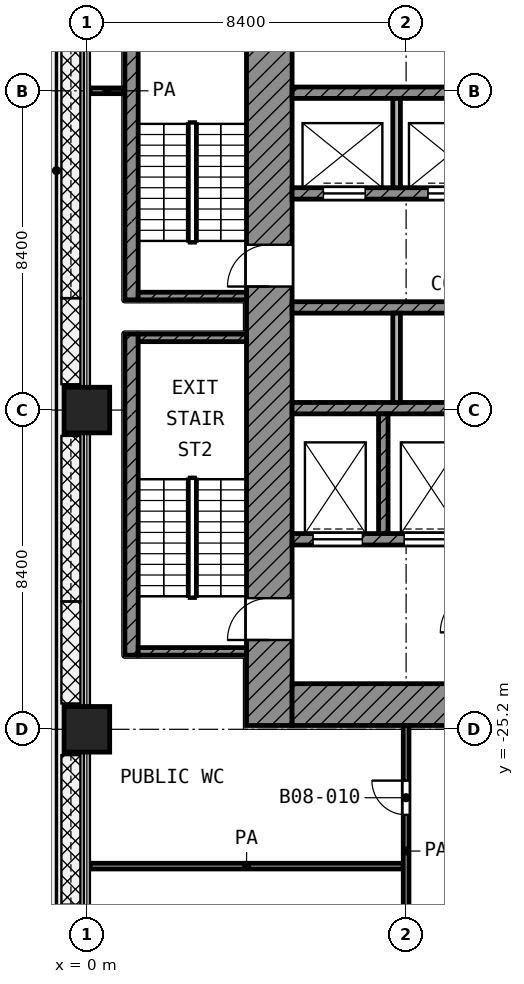
"""IFC4 building model, lengths in metres.
Left out: names, types, materials, properties, quantities, classifications, styles, units other than length and angle.
Written with IfcOpenShell. Run it as: python <this file> out.ifc"""

import sys

from ifc_helpers import new_model, si_unit, direction, frame, frame_2d, origin, origin_2d, place, context, subcontext, project, spatial, rectangle, extrude, element, fill, save


model = new_model("IFC4")
c1 = context("Model", 3, precision=1e-05, world=origin(), true_north=direction((0.0, 1.0)))
c2 = subcontext(c1, "Body", "Model", "MODEL_VIEW")
j1 = project(units=[si_unit("LENGTHUNIT", "METRE"), si_unit("PLANEANGLEUNIT", "RADIAN")], contexts=[c1])
p1 = place(None, origin())
s1 = spatial("IfcSite", under=j1, at=p1, CompositionType="ELEMENT")
p2 = place(p1, origin())
s2 = spatial("IfcBuilding", under=s1, at=p2, CompositionType="ELEMENT")
p3 = place(p2, frame((0.0, 0.0, 39.2)))
s3 = spatial("IfcBuildingStorey", under=s2, at=p3, CompositionType="ELEMENT", Elevation=39.2)
for number, where, z_axis, x_axis in (
    (1, (0.0, -16.8, 0.0), (0.0, 0.0, 1.0), (1.0, 0.0, 0.0)),
    (2, (0.0, -25.2, 0.0), (0.0, 0.0, 1.0), (1.0, 0.0, 0.0)),
):
    element("IfcColumn", number, at=place(p3, frame(where, z_axis=z_axis, x_axis=x_axis)), inside=s3, PredefinedType="COLUMN", context=c2, shape_type="SweptSolid", body=[
        extrude(rectangle(XDim=1.2, YDim=1.2, at=origin_2d()), origin(), (0.0, 0.0, 1.0), 4.2),
    ])
p4 = place(p3, frame((4.8, -25.1, 0.0), z_axis=(0.0, 0.0, 1.0), x_axis=(0.0, 1.0, 0.0)))
e3 = element("IfcWall", 3, at=p4, inside=s3, PredefinedType="SHEAR", context=c2, shape_type="SweptSolid", body=[
    extrude(rectangle(XDim=19.7, YDim=1.2, at=frame_2d((9.85, 0.0))), origin(), (0.0, 0.0, 1.0), 3.9),
])
p5 = place(p4, frame((11.55, 0.0, 0.0)))
e4 = element("IfcOpeningElement", 4, at=p5, cuts=e3, PredefinedType="OPENING", context=c2, shape_type="SweptSolid", body=[
    extrude(rectangle(XDim=1.1, YDim=2.1, at=frame_2d((0.55, 1.05))), frame((0.0, 0.61, 0.0), z_axis=(0.0, -1.0, 0.0), x_axis=(1.0, 0.0, 0.0)), (0.0, 0.0, 1.0), 1.22),
])
p6 = place(p4, frame((2.25, 0.0, 0.0)))
e5 = element("IfcOpeningElement", 5, at=p6, cuts=e3, PredefinedType="OPENING", context=c2, shape_type="SweptSolid", body=[
    extrude(rectangle(XDim=1.1, YDim=2.1, at=frame_2d((0.55, 1.05))), frame((0.0, 0.61, 0.0), z_axis=(0.0, -1.0, 0.0), x_axis=(1.0, 0.0, 0.0)), (0.0, 0.0, 1.0), 1.22),
])
p7 = place(p3, frame((5.4, -24.55, 0.0), z_axis=(0.0, 0.0, 1.0), x_axis=(1.0, 0.0, 0.0)))
e6 = element("IfcWall", 6, at=p7, inside=s3, PredefinedType="SHEAR", context=c2, shape_type="SweptSolid", body=[
    extrude(rectangle(XDim=18.6, YDim=1.1, at=frame_2d((9.3, 0.0))), origin(), (0.0, 0.0, 1.0), 3.9),
])
p8 = place(p7, frame((6.3, 0.0, 0.0)))
e7 = element("IfcOpeningElement", 7, at=p8, cuts=e6, PredefinedType="OPENING", context=c2, shape_type="SweptSolid", body=[
    extrude(rectangle(XDim=1.8, YDim=2.1, at=frame_2d((0.9, 1.05))), frame((0.0, 0.56, 0.0), z_axis=(0.0, -1.0, 0.0), x_axis=(1.0, 0.0, 0.0)), (0.0, 0.0, 1.0), 1.12),
])
p9 = place(p3, frame((5.4, -8.45, 0.0), z_axis=(0.0, 0.0, 1.0), x_axis=(1.0, 0.0, 0.0)))
e8 = element("IfcWall", 8, at=p9, inside=s3, PredefinedType="SHEAR", context=c2, shape_type="SweptSolid", body=[
    extrude(rectangle(XDim=16.65, YDim=0.3, at=frame_2d((8.325, 0.0))), origin(), (0.0, 0.0, 1.0), 3.9),
])
p10 = place(p3, frame((5.4, -11.1, 0.0), z_axis=(0.0, 0.0, 1.0), x_axis=(1.0, 0.0, 0.0)))
e9 = element("IfcWall", 9, at=p10, inside=s3, PredefinedType="SHEAR", context=c2, shape_type="SweptSolid", body=[
    extrude(rectangle(XDim=16.65, YDim=0.3, at=frame_2d((8.325, 0.0))), origin(), (0.0, 0.0, 1.0), 3.9),
])
p11 = place(p10, frame((0.825, 0.0, 0.0)))
e10 = element("IfcOpeningElement", 10, at=p11, cuts=e9, PredefinedType="OPENING", context=c2, shape_type="SweptSolid", body=[
    extrude(rectangle(XDim=1.1, YDim=2.1, at=frame_2d((0.55, 1.05))), frame((0.0, 0.16, 0.0), z_axis=(0.0, -1.0, 0.0), x_axis=(1.0, 0.0, 0.0)), (0.0, 0.0, 1.0), 0.32),
])
p12 = place(p10, frame((3.575, 0.0, 0.0)))
e11 = element("IfcOpeningElement", 11, at=p12, cuts=e9, PredefinedType="OPENING", context=c2, shape_type="SweptSolid", body=[
    extrude(rectangle(XDim=1.1, YDim=2.1, at=frame_2d((0.55, 1.05))), frame((0.0, 0.16, 0.0), z_axis=(0.0, -1.0, 0.0), x_axis=(1.0, 0.0, 0.0)), (0.0, 0.0, 1.0), 0.32),
])
p13 = place(p10, frame((6.325, 0.0, 0.0)))
e12 = element("IfcOpeningElement", 12, at=p13, cuts=e9, PredefinedType="OPENING", context=c2, shape_type="SweptSolid", body=[
    extrude(rectangle(XDim=1.1, YDim=2.1, at=frame_2d((0.55, 1.05))), frame((0.0, 0.16, 0.0), z_axis=(0.0, -1.0, 0.0), x_axis=(1.0, 0.0, 0.0)), (0.0, 0.0, 1.0), 0.32),
])
p14 = place(p10, frame((9.075, 0.0, 0.0)))
e13 = element("IfcOpeningElement", 13, at=p14, cuts=e9, PredefinedType="OPENING", context=c2, shape_type="SweptSolid", body=[
    extrude(rectangle(XDim=1.1, YDim=2.1, at=frame_2d((0.55, 1.05))), frame((0.0, 0.16, 0.0), z_axis=(0.0, -1.0, 0.0), x_axis=(1.0, 0.0, 0.0)), (0.0, 0.0, 1.0), 0.32),
])
for number, where, z_axis, x_axis in (
    (14, (5.4, -14.1, 0.0), (0.0, 0.0, 1.0), (1.0, 0.0, 0.0)),
    (15, (5.4, -16.75, 0.0), (0.0, 0.0, 1.0), (1.0, 0.0, 0.0)),
):
    element("IfcWall", number, at=place(p3, frame(where, z_axis=z_axis, x_axis=x_axis)), inside=s3, PredefinedType="SHEAR", context=c2, shape_type="SweptSolid", body=[
        extrude(rectangle(XDim=16.65, YDim=0.3, at=frame_2d((8.325, 0.0))), origin(), (0.0, 0.0, 1.0), 3.9),
    ])
p15 = place(p3, frame((5.4, -20.2, 0.0), z_axis=(0.0, 0.0, 1.0), x_axis=(1.0, 0.0, 0.0)))
e16 = element("IfcWall", 16, at=p15, inside=s3, PredefinedType="SHEAR", context=c2, shape_type="SweptSolid", body=[
    extrude(rectangle(XDim=14.65, YDim=0.3, at=frame_2d((7.325, 0.0))), origin(), (0.0, 0.0, 1.0), 3.9),
])
p16 = place(p15, frame((10.55, 0.0, 0.0)))
e17 = element("IfcOpeningElement", 17, at=p16, cuts=e16, PredefinedType="OPENING", context=c2, shape_type="SweptSolid", body=[
    extrude(rectangle(XDim=1.3, YDim=2.1, at=frame_2d((0.65, 1.05))), frame((0.0, 0.16, 0.0), z_axis=(0.0, -1.0, 0.0), x_axis=(1.0, 0.0, 0.0)), (0.0, 0.0, 1.0), 0.32),
])
p17 = place(p15, frame((12.95, 0.0, 0.0)))
e18 = element("IfcOpeningElement", 18, at=p17, cuts=e16, PredefinedType="OPENING", context=c2, shape_type="SweptSolid", body=[
    extrude(rectangle(XDim=1.3, YDim=2.1, at=frame_2d((0.65, 1.05))), frame((0.0, 0.16, 0.0), z_axis=(0.0, -1.0, 0.0), x_axis=(1.0, 0.0, 0.0)), (0.0, 0.0, 1.0), 0.32),
])
p18 = place(p15, frame((0.55, 0.0, 0.0)))
e19 = element("IfcOpeningElement", 19, at=p18, cuts=e16, PredefinedType="OPENING", context=c2, shape_type="SweptSolid", body=[
    extrude(rectangle(XDim=1.3, YDim=2.1, at=frame_2d((0.65, 1.05))), frame((0.0, 0.16, 0.0), z_axis=(0.0, -1.0, 0.0), x_axis=(1.0, 0.0, 0.0)), (0.0, 0.0, 1.0), 0.32),
])
p19 = place(p15, frame((2.95, 0.0, 0.0)))
e20 = element("IfcOpeningElement", 20, at=p19, cuts=e16, PredefinedType="OPENING", context=c2, shape_type="SweptSolid", body=[
    extrude(rectangle(XDim=1.3, YDim=2.1, at=frame_2d((0.65, 1.05))), frame((0.0, 0.16, 0.0), z_axis=(0.0, -1.0, 0.0), x_axis=(1.0, 0.0, 0.0)), (0.0, 0.0, 1.0), 0.32),
])
p20 = place(p15, frame((7.15, 0.0, 0.0)))
e21 = element("IfcOpeningElement", 21, at=p20, cuts=e16, PredefinedType="OPENING", context=c2, shape_type="SweptSolid", body=[
    extrude(rectangle(XDim=0.9, YDim=2.1, at=frame_2d((0.45, 1.05))), frame((0.0, 0.16, 0.0), z_axis=(0.0, -1.0, 0.0), x_axis=(1.0, 0.0, 0.0)), (0.0, 0.0, 1.0), 0.32),
])
p21 = place(p3, frame((7.8, -20.05, 0.0), z_axis=(0.0, 0.0, 1.0), x_axis=(0.0, 1.0, 0.0)))
e22 = element("IfcWall", 22, at=p21, inside=s3, PredefinedType="SHEAR", context=c2, shape_type="SweptSolid", body=[
    extrude(rectangle(XDim=3.15, YDim=0.25, at=frame_2d((1.575, 0.0))), origin(), (0.0, 0.0, 1.0), 3.9),
])
p22 = place(p3, frame((8.15, -10.95, 0.0), z_axis=(0.0, 0.0, 1.0), x_axis=(0.0, 1.0, 0.0)))
e23 = element("IfcWall", 23, at=p22, inside=s3, PredefinedType="PARTITIONING", context=c2, shape_type="SweptSolid", body=[
    extrude(rectangle(XDim=2.35, YDim=0.2, at=frame_2d((1.175, 0.0))), origin(), (0.0, 0.0, 1.0), 3.9),
])
p23 = place(p3, frame((8.15, -16.6, 0.0), z_axis=(0.0, 0.0, 1.0), x_axis=(0.0, 1.0, 0.0)))
e24 = element("IfcWall", 24, at=p23, inside=s3, PredefinedType="PARTITIONING", context=c2, shape_type="SweptSolid", body=[
    extrude(rectangle(XDim=2.35, YDim=0.2, at=frame_2d((1.175, 0.0))), origin(), (0.0, 0.0, 1.0), 3.9),
])
p24 = place(p3, frame((1.175, -13.9, 0.0), z_axis=(0.0, 0.0, 1.0), x_axis=(0.0, 1.0, 0.0)))
e25 = element("IfcWall", 25, at=p24, inside=s3, PredefinedType="SHEAR", context=c2, shape_type="SweptSolid", body=[
    extrude(rectangle(XDim=8.45, YDim=0.35, at=frame_2d((4.225, 0.0))), origin(), (0.0, 0.0, 1.0), 3.9),
])
p25 = place(p3, frame((1.35, -13.8, 0.0), z_axis=(0.0, 0.0, 1.0), x_axis=(1.0, 0.0, 0.0)))
e26 = element("IfcWall", 26, at=p25, inside=s3, PredefinedType="SHEAR", context=c2, shape_type="SweptSolid", body=[
    extrude(rectangle(XDim=2.85, YDim=0.2, at=frame_2d((1.425, 0.0))), origin(), (0.0, 0.0, 1.0), 3.9),
])
p26 = place(p3, frame((1.175, -23.25, 0.0), z_axis=(0.0, 0.0, 1.0), x_axis=(0.0, 1.0, 0.0)))
e27 = element("IfcWall", 27, at=p26, inside=s3, PredefinedType="SHEAR", context=c2, shape_type="SweptSolid", body=[
    extrude(rectangle(XDim=8.45, YDim=0.35, at=frame_2d((4.225, 0.0))), origin(), (0.0, 0.0, 1.0), 3.9),
])
for number, where, z_axis, x_axis in (
    (28, (1.35, -14.9, 0.0), (0.0, 0.0, 1.0), (1.0, 0.0, 0.0)),
    (29, (1.35, -23.15, 0.0), (0.0, 0.0, 1.0), (1.0, 0.0, 0.0)),
):
    element("IfcWall", number, at=place(p3, frame(where, z_axis=z_axis, x_axis=x_axis)), inside=s3, PredefinedType="SHEAR", context=c2, shape_type="SweptSolid", body=[
        extrude(rectangle(XDim=2.85, YDim=0.2, at=frame_2d((1.425, 0.0))), origin(), (0.0, 0.0, 1.0), 3.9),
    ])
p27 = place(p3, frame((0.08, -28.8, 0.0), z_axis=(0.0, 0.0, 1.0), x_axis=(1.0, 0.0, 0.0)))
e30 = element("IfcWall", 30, at=p27, inside=s3, PredefinedType="PARTITIONING", context=c2, shape_type="SweptSolid", body=[
    extrude(rectangle(XDim=8.245, YDim=0.15, at=frame_2d((4.123, 0.0))), origin(), (0.0, 0.0, 1.0), 3.9),
])
p28 = place(p3, frame((0.08, -8.4, 0.0), z_axis=(0.0, 0.0, 1.0), x_axis=(1.0, 0.0, 0.0)))
e31 = element("IfcWall", 31, at=p28, inside=s3, PredefinedType="PARTITIONING", context=c2, shape_type="SweptSolid", body=[
    extrude(rectangle(XDim=0.89, YDim=0.15, at=frame_2d((0.445, 0.0))), origin(), (0.0, 0.0, 1.0), 3.9),
])
p29 = place(p3, frame((8.4, -31.707, 0.0), z_axis=(0.0, 0.0, 1.0), x_axis=(0.0, 1.0, 0.0)))
e32 = element("IfcWall", 32, at=p29, inside=s3, PredefinedType="PARTITIONING", context=c2, shape_type="SweptSolid", body=[
    extrude(rectangle(XDim=6.607, YDim=0.15, at=frame_2d((3.303, 0.0))), origin(), (0.0, 0.0, 1.0), 3.9),
])
p30 = place(p29, frame((4.257, 0.0, 0.0)))
e33 = element("IfcOpeningElement", 33, at=p30, cuts=e32, PredefinedType="OPENING", context=c2, shape_type="SweptSolid", body=[
    extrude(rectangle(XDim=0.9, YDim=2.1, at=frame_2d((0.45, 1.05))), frame((0.0, 0.085, 0.0), z_axis=(0.0, -1.0, 0.0), x_axis=(1.0, 0.0, 0.0)), (0.0, 0.0, 1.0), 0.17),
])
p31 = place(p11, origin())
e34 = element("IfcDoor", 34, at=p31, inside=s3, OperationType="DOUBLE_DOOR_SLIDING", PredefinedType="DOOR", context=c2, shape_type="SweptSolid", body=[
    extrude(rectangle(XDim=1.1, YDim=2.1, at=frame_2d((0.55, 1.05))), frame((0.0, 0.025, 0.0), z_axis=(0.0, -1.0, 0.0), x_axis=(1.0, 0.0, 0.0)), (0.0, 0.0, 1.0), 0.05),
])
fill(e10, e34)
p32 = place(p12, origin())
e35 = element("IfcDoor", 35, at=p32, inside=s3, OperationType="DOUBLE_DOOR_SLIDING", PredefinedType="DOOR", context=c2, shape_type="SweptSolid", body=[
    extrude(rectangle(XDim=1.1, YDim=2.1, at=frame_2d((0.55, 1.05))), frame((0.0, 0.025, 0.0), z_axis=(0.0, -1.0, 0.0), x_axis=(1.0, 0.0, 0.0)), (0.0, 0.0, 1.0), 0.05),
])
fill(e11, e35)
p33 = place(p18, origin())
e36 = element("IfcDoor", 36, at=p33, inside=s3, OperationType="DOUBLE_DOOR_SLIDING", PredefinedType="DOOR", context=c2, shape_type="SweptSolid", body=[
    extrude(rectangle(XDim=1.3, YDim=2.1, at=frame_2d((0.65, 1.05))), frame((0.0, 0.025, 0.0), z_axis=(0.0, -1.0, 0.0), x_axis=(1.0, 0.0, 0.0)), (0.0, 0.0, 1.0), 0.05),
])
fill(e19, e36)
p34 = place(p19, origin())
e37 = element("IfcDoor", 37, at=p34, inside=s3, OperationType="DOUBLE_DOOR_SLIDING", PredefinedType="DOOR", context=c2, shape_type="SweptSolid", body=[
    extrude(rectangle(XDim=1.3, YDim=2.1, at=frame_2d((0.65, 1.05))), frame((0.0, 0.025, 0.0), z_axis=(0.0, -1.0, 0.0), x_axis=(1.0, 0.0, 0.0)), (0.0, 0.0, 1.0), 0.05),
])
fill(e20, e37)
p35 = place(p5, origin())
e38 = element("IfcDoor", 38, at=p35, inside=s3, OperationType="SINGLE_SWING_LEFT", PredefinedType="DOOR", context=c2, shape_type="SweptSolid", body=[
    extrude(rectangle(XDim=1.1, YDim=2.1, at=frame_2d((0.55, 1.05))), frame((0.0, 0.025, 0.0), z_axis=(0.0, -1.0, 0.0), x_axis=(1.0, 0.0, 0.0)), (0.0, 0.0, 1.0), 0.05),
])
fill(e4, e38)
p36 = place(p6, origin())
e39 = element("IfcDoor", 39, at=p36, inside=s3, OperationType="SINGLE_SWING_LEFT", PredefinedType="DOOR", context=c2, shape_type="SweptSolid", body=[
    extrude(rectangle(XDim=1.1, YDim=2.1, at=frame_2d((0.55, 1.05))), frame((0.0, 0.025, 0.0), z_axis=(0.0, -1.0, 0.0), x_axis=(1.0, 0.0, 0.0)), (0.0, 0.0, 1.0), 0.05),
])
fill(e5, e39)
p37 = place(p30, origin())
e40 = element("IfcDoor", 40, at=p37, inside=s3, OperationType="SINGLE_SWING_RIGHT", PredefinedType="DOOR", context=c2, shape_type="SweptSolid", body=[
    extrude(rectangle(XDim=0.9, YDim=2.1, at=frame_2d((0.45, 1.05))), frame((0.0, 0.025, 0.0), z_axis=(0.0, -1.0, 0.0), x_axis=(1.0, 0.0, 0.0)), (0.0, 0.0, 1.0), 0.05),
])
fill(e33, e40)
save(model, sys.argv[1])
